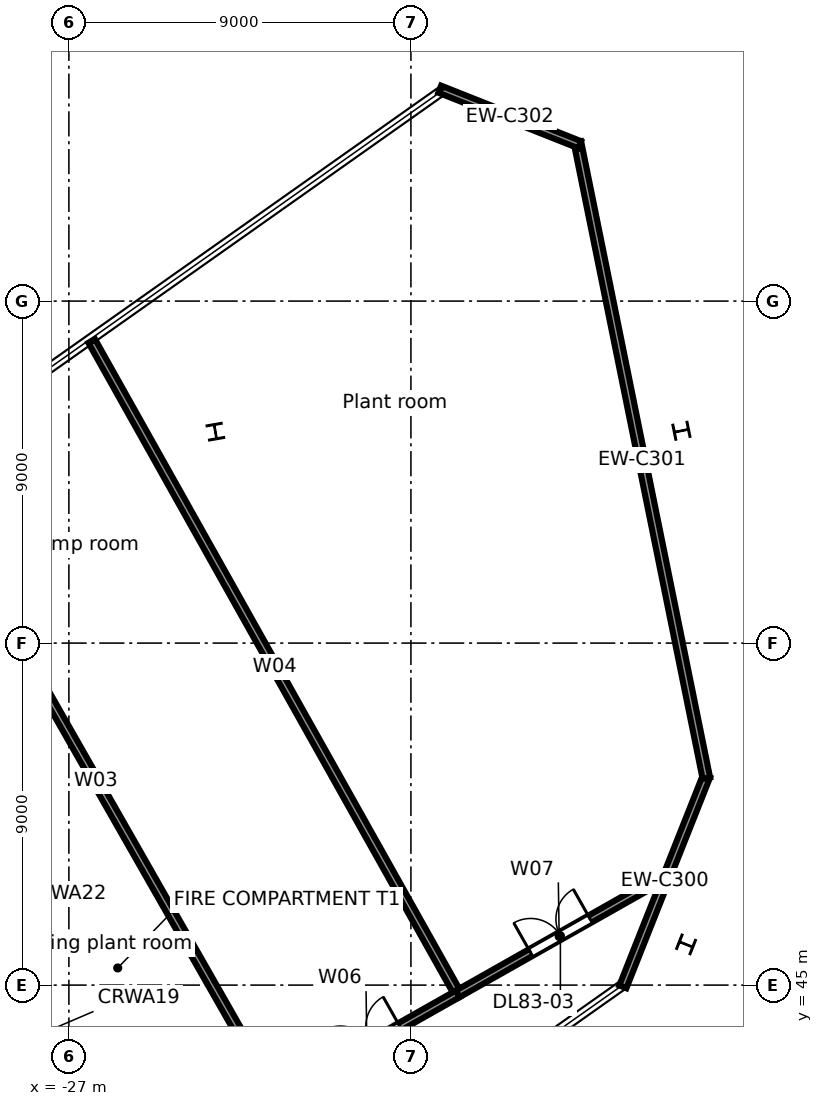
"""IFC4 building model, lengths in metres.
Left out: names, types, materials, properties, quantities, classifications, styles, units other than length and angle.
Written with IfcOpenShell. Run it as: python <this file> out.ifc"""

import sys

from ifc_helpers import new_model, si_unit, direction, frame, frame_2d, origin, origin_2d, place, context, subcontext, project, spatial, rectangle, i_section, extrude, element, fill, save


model = new_model("IFC4")
c1 = context("Model", 3, precision=1e-05, world=origin(), true_north=direction((0.0, 1.0)))
c2 = subcontext(c1, "Body", "Model", "MODEL_VIEW")
j1 = project(units=[si_unit("LENGTHUNIT", "METRE"), si_unit("PLANEANGLEUNIT", "RADIAN")], contexts=[c1])
p1 = place(None, origin())
s1 = spatial("IfcSite", under=j1, at=p1, CompositionType="ELEMENT")
p2 = place(p1, origin())
s2 = spatial("IfcBuilding", under=s1, at=p2, CompositionType="ELEMENT")
p3 = place(p2, frame((0.0, 0.0, 361.3)))
s3 = spatial("IfcBuildingStorey", under=s2, at=p3, CompositionType="ELEMENT", Elevation=361.3)
for number, where, z_axis, x_axis in (
    (1, (-10.76, 46.071, 0.0), (0.0, 0.0, 1.0), (0.369, 0.929, 0.0)),
    (2, (-10.882, 59.587, 0.0), (0.0, 0.0, 1.0), (-0.199, 0.98, 0.0)),
):
    element("IfcColumn", number, at=place(p3, frame(where, z_axis=z_axis, x_axis=x_axis)), inside=s3, PredefinedType="COLUMN", context=c2, shape_type="SweptSolid", body=[
        extrude(i_section(OverallWidth=0.4, OverallDepth=0.4, WebThickness=0.013, FlangeThickness=0.021, FilletRadius=0.022, at=origin_2d()), origin(), (0.0, 0.0, 1.0), 3.6),
    ])
p4 = place(p3, frame((-23.146, 59.563, -0.3), z_axis=(0.0, 0.0, 1.0), x_axis=(0.985345447257, 0.170570658584, 0.0)))
e3 = element("IfcColumn", 3, at=p4, inside=s3, PredefinedType="COLUMN", context=c2, shape_type="SweptSolid", body=[
    extrude(i_section(OverallWidth=0.4, OverallDepth=0.4, WebThickness=0.013, FlangeThickness=0.021, FilletRadius=0.022, at=origin_2d()), origin(), (0.0, 0.0, 1.0), 3.9),
])
p5 = place(p3, frame((-10.22, 50.501, 0.0), z_axis=(0.0, 0.0, 1.0), x_axis=(-0.369026712049, -0.929418789241, 0.0)))
e4 = element("IfcWall", 4, at=p5, inside=s3, PredefinedType="STANDARD", context=c2, shape_type="SweptSolid", body=[
    extrude(rectangle(XDim=5.968, YDim=0.2, at=frame_2d((2.984, 0.0))), origin(), (0.0, 0.0, 1.0), 2.7),
])
p6 = place(p3, frame((-13.62, 67.188, 0.0), z_axis=(0.0, 0.0, 1.0), x_axis=(0.198668549131, -0.980066736292, 0.0)))
e5 = element("IfcWall", 5, at=p6, inside=s3, PredefinedType="STANDARD", context=c2, shape_type="SweptSolid", body=[
    extrude(rectangle(XDim=17.084, YDim=0.2, at=frame_2d((8.542, 0.0))), origin(), (0.0, 0.0, 1.0), 2.7),
])
p7 = place(p3, frame((-17.241, 68.577, 0.0), z_axis=(0.0, 0.0, 1.0), x_axis=(0.929408544005, -0.369052514325, 0.0)))
e6 = element("IfcWall", 6, at=p7, inside=s3, PredefinedType="STANDARD", context=c2, shape_type="SweptSolid", body=[
    extrude(rectangle(XDim=3.963, YDim=0.2, at=frame_2d((1.981, 0.0))), origin(), (0.0, 0.0, 1.0), 3.3),
])
p8 = place(p3, frame((-31.792, 49.653, 0.0), z_axis=(0.0, 0.0, 1.0), x_axis=(0.492421943245, -0.870356610712, 0.0)))
e7 = element("IfcWall", 7, at=p8, inside=s3, PredefinedType="SOLIDWALL", context=c2, shape_type="SweptSolid", body=[
    extrude(rectangle(XDim=13.3, YDim=0.35, at=frame_2d((6.65, 0.0))), origin(), (0.0, 0.0, 1.0), 3.3),
])
p9 = place(p3, frame((-31.031, 58.679, 0.0), z_axis=(0.0, 0.0, 1.0), x_axis=(0.495492853456, -0.868612014753, 0.0)))
e8 = element("IfcWall", 8, at=p9, inside=s3, PredefinedType="PARTITIONING", context=c2, shape_type="SweptSolid", body=[
    extrude(rectangle(XDim=19.13, YDim=0.2, at=frame_2d((9.565, 0.0))), origin(), (0.0, 0.0, 1.0), 2.68),
])
p10 = place(p3, frame((-26.399, 61.95, 0.0), z_axis=(0.0, 0.0, 1.0), x_axis=(0.489116217078, -0.872218622933, 0.0)))
e9 = element("IfcWall", 9, at=p10, inside=s3, PredefinedType="PARTITIONING", context=c2, shape_type="SweptSolid", body=[
    extrude(rectangle(XDim=19.697, YDim=0.2, at=frame_2d((9.848, 0.0))), origin(), (0.0, 0.0, 1.0), 2.68),
])
p11 = place(p3, frame((-21.552, 42.062, 0.0), z_axis=(0.0, 0.0, 1.0), x_axis=(0.870387515286, 0.492367315359, 0.0)))
e10 = element("IfcWall", 10, at=p11, inside=s3, PredefinedType="PARTITIONING", context=c2, shape_type="SweptSolid", body=[
    extrude(rectangle(XDim=5.5, YDim=0.2, at=frame_2d((2.75, 0.0))), origin(), (0.0, 0.0, 1.0), 3.3),
])
p12 = place(p11, frame((1.95, 0.0, 0.0)))
e11 = element("IfcOpeningElement", 11, at=p12, cuts=e10, PredefinedType="OPENING", context=c2, shape_type="SweptSolid", body=[
    extrude(rectangle(XDim=1.8, YDim=2.1, at=frame_2d((0.9, 1.05))), frame((0.0, 0.11, 0.0), z_axis=(0.0, -1.0, 0.0), x_axis=(1.0, 0.0, 0.0)), (0.0, 0.0, 1.0), 0.22),
])
p13 = place(p3, frame((-16.765, 44.77, 0.0), z_axis=(0.0, 0.0, 1.0), x_axis=(0.870320026037, 0.492486601116, 0.0)))
e12 = element("IfcWall", 12, at=p13, inside=s3, PredefinedType="PARTITIONING", context=c2, shape_type="SweptSolid", body=[
    extrude(rectangle(XDim=6.126, YDim=0.2, at=frame_2d((3.063, 0.0))), origin(), (0.0, 0.0, 1.0), 3.3),
])
p14 = place(p13, frame((2.2, 0.0, 0.0)))
e13 = element("IfcOpeningElement", 13, at=p14, cuts=e12, PredefinedType="OPENING", context=c2, shape_type="SweptSolid", body=[
    extrude(rectangle(XDim=1.8, YDim=2.1, at=frame_2d((0.9, 1.05))), frame((0.0, 0.11, 0.0), z_axis=(0.0, -1.0, 0.0), x_axis=(1.0, 0.0, 0.0)), (0.0, 0.0, 1.0), 0.22),
])
p15 = place(p12, origin())
e14 = element("IfcDoor", 14, at=p15, inside=s3, OperationType="DOUBLE_DOOR_SINGLE_SWING", PredefinedType="DOOR", context=c2, shape_type="SweptSolid", body=[
    extrude(rectangle(XDim=1.8, YDim=2.1, at=frame_2d((0.9, 1.05))), frame((0.0, 0.025, 0.0), z_axis=(0.0, -1.0, 0.0), x_axis=(1.0, 0.0, 0.0)), (0.0, 0.0, 1.0), 0.05),
])
fill(e11, e14)
p16 = place(p14, origin())
e15 = element("IfcDoor", 15, at=p16, inside=s3, OperationType="DOUBLE_DOOR_SINGLE_SWING", PredefinedType="DOOR", context=c2, shape_type="SweptSolid", body=[
    extrude(rectangle(XDim=1.8, YDim=2.1, at=frame_2d((0.9, 1.05))), frame((0.0, 0.025, 0.0), z_axis=(0.0, -1.0, 0.0), x_axis=(1.0, 0.0, 0.0)), (0.0, 0.0, 1.0), 0.05),
])
fill(e13, e15)
save(model, sys.argv[1])
